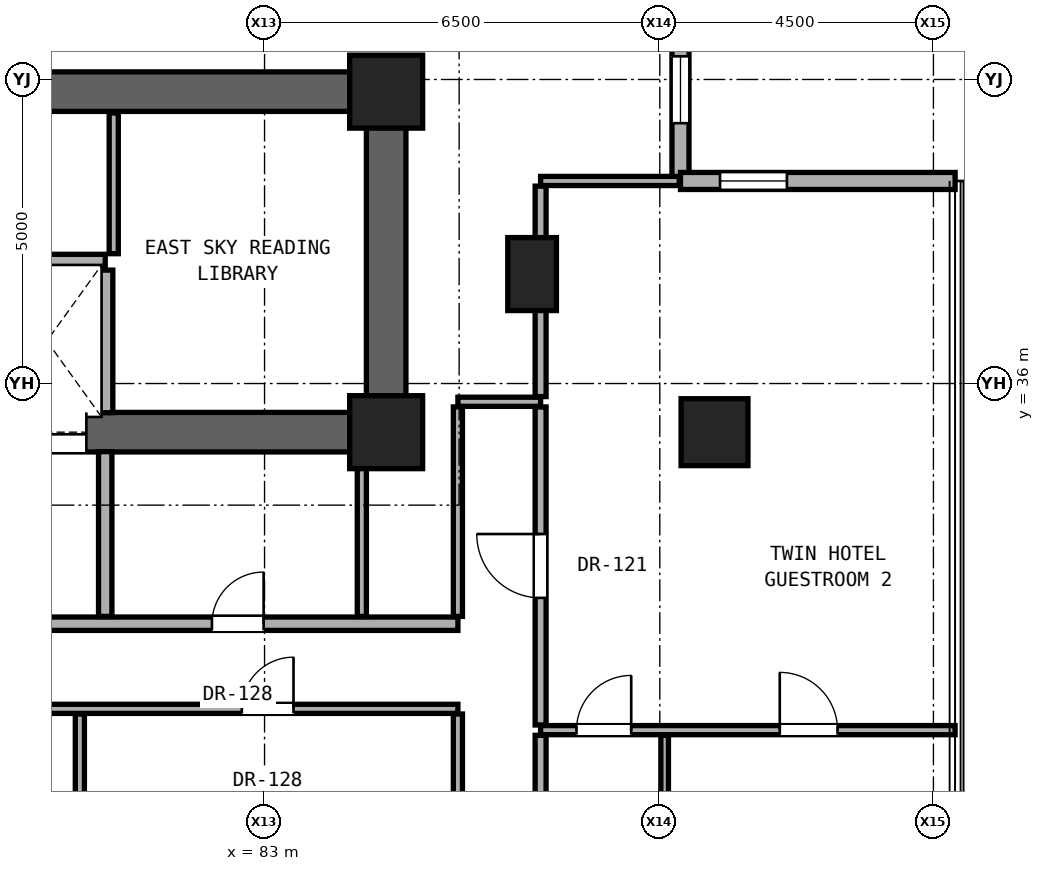
"""IFC4 building model, lengths in metres.
Left out: names, types, materials, properties, quantities, classifications, styles, units other than length and angle.
Written with IfcOpenShell. Run it as: python <this file> out.ifc"""

import sys

from ifc_helpers import new_model, si_unit, direction, frame, frame_2d, origin, origin_2d, place, context, subcontext, project, spatial, rectangle, hollow_rectangle, extrude, element, fill, save


model = new_model("IFC4")
c1 = context("Model", 3, precision=1e-05, world=origin(), true_north=direction((0.0, 1.0)))
c2 = subcontext(c1, "Body", "Model", "MODEL_VIEW")
j1 = project(units=[si_unit("LENGTHUNIT", "METRE"), si_unit("PLANEANGLEUNIT", "RADIAN")], contexts=[c1])
p1 = place(None, origin())
s1 = spatial("IfcSite", under=j1, at=p1, CompositionType="ELEMENT")
p2 = place(p1, origin())
s2 = spatial("IfcBuilding", under=s1, at=p2, CompositionType="ELEMENT")
p3 = place(p2, frame((0.0, 0.0, 98.3)))
s3 = spatial("IfcBuildingStorey", under=s2, at=p3, CompositionType="ELEMENT", Elevation=98.3)
for number, where, z_axis, x_axis in (
    (1, (85.0, 35.2, 0.0), (0.0, 0.0, 1.0), (1.0, 0.0, 0.0)),
    (2, (85.0, 40.8, 0.0), (0.0, 0.0, 1.0), (1.0, 0.0, 0.0)),
):
    element("IfcColumn", number, at=place(p3, frame(where, z_axis=z_axis, x_axis=x_axis)), inside=s3, PredefinedType="COLUMN", context=c2, shape_type="SweptSolid", body=[
        extrude(rectangle(XDim=1.2, YDim=1.2, at=origin_2d()), origin(), (0.0, 0.0, 1.0), 3.3),
    ])
p4 = place(p3, frame((90.4, 35.2, 0.0), z_axis=(0.0, 0.0, 1.0), x_axis=(1.0, 0.0, 0.0)))
e3 = element("IfcColumn", 3, at=p4, inside=s3, PredefinedType="COLUMN", context=c2, shape_type="SweptSolid", body=[
    extrude(hollow_rectangle(XDim=1.1, YDim=1.1, WallThickness=0.06, at=origin_2d()), origin(), (0.0, 0.0, 1.0), 3.3),
])
p5 = place(p3, frame((87.4, 37.8, 0.0), z_axis=(0.0, 0.0, 1.0), x_axis=(1.0, 0.0, 0.0)))
e4 = element("IfcColumn", 4, at=p5, inside=s3, PredefinedType="PILASTER", context=c2, shape_type="SweptSolid", body=[
    extrude(rectangle(XDim=0.8, YDim=1.2, at=origin_2d()), origin(), (0.0, 0.0, 1.0), 3.3),
])
p6 = place(p3, frame((68.0, 40.8, 0.0), z_axis=(0.0, 0.0, 1.0), x_axis=(1.0, 0.0, 0.0)))
e5 = element("IfcWall", 5, at=p6, inside=s3, PredefinedType="SHEAR", context=c2, shape_type="SweptSolid", body=[
    extrude(rectangle(XDim=17.0, YDim=0.65, at=frame_2d((8.5, 0.0))), origin(), (0.0, 0.0, 1.0), 3.08),
])
p7 = place(p3, frame((85.0, 35.2, 0.0), z_axis=(0.0, 0.0, 1.0), x_axis=(0.0, 1.0, 0.0)))
e6 = element("IfcWall", 6, at=p7, inside=s3, PredefinedType="SHEAR", context=c2, shape_type="SweptSolid", body=[
    extrude(rectangle(XDim=5.6, YDim=0.65, at=frame_2d((2.8, 0.0))), origin(), (0.0, 0.0, 1.0), 3.08),
])
p8 = place(p3, frame((68.0, 35.2, 0.0), z_axis=(0.0, 0.0, 1.0), x_axis=(1.0, 0.0, 0.0)))
e7 = element("IfcWall", 7, at=p8, inside=s3, PredefinedType="SHEAR", context=c2, shape_type="SweptSolid", body=[
    extrude(rectangle(XDim=17.0, YDim=0.65, at=frame_2d((8.5, 0.0))), origin(), (0.0, 0.0, 1.0), 3.08),
])
p9 = place(p8, frame((1.06, 0.0, 0.0)))
e8 = element("IfcOpeningElement", 8, at=p9, cuts=e7, PredefinedType="OPENING", context=c2, shape_type="SweptSolid", body=[
    extrude(rectangle(XDim=1.15, YDim=2.2, at=frame_2d((0.575, 1.1))), frame((0.0, 0.335, 0.0), z_axis=(0.0, -1.0, 0.0), x_axis=(1.0, 0.0, 0.0)), (0.0, 0.0, 1.0), 0.67),
])
p10 = place(p8, frame((8.75, 0.0, 0.0)))
e9 = element("IfcOpeningElement", 9, at=p10, cuts=e7, PredefinedType="OPENING", context=c2, shape_type="SweptSolid", body=[
    extrude(rectangle(XDim=1.4, YDim=2.35, at=frame_2d((0.7, 1.175))), frame((0.0, 0.335, 0.0), z_axis=(0.0, -1.0, 0.0), x_axis=(1.0, 0.0, 0.0)), (0.0, 0.0, 1.0), 0.67),
])
p11 = place(p8, frame((10.77, 0.0, 0.0)))
e10 = element("IfcOpeningElement", 10, at=p11, cuts=e7, PredefinedType="OPENING", context=c2, shape_type="SweptSolid", body=[
    extrude(rectangle(XDim=1.3, YDim=2.3, at=frame_2d((0.65, 1.15))), frame((0.0, 0.335, 0.0), z_axis=(0.0, -1.0, 0.0), x_axis=(1.0, 0.0, 0.0)), (0.0, 0.0, 1.0), 0.67),
])
p12 = place(p3, frame((89.84, 39.331, 0.0), z_axis=(0.0, 0.0, 1.0), x_axis=(0.0, 1.0, 0.0)))
e11 = element("IfcWall", 11, at=p12, inside=s3, PredefinedType="SOLIDWALL", context=c2, shape_type="SweptSolid", body=[
    extrude(rectangle(XDim=4.516, YDim=0.28, at=frame_2d((2.258, 0.0))), origin(), (0.0, 0.0, 1.0), 3.06),
])
p13 = place(p12, frame((0.95, 0.0, 0.85)))
e12 = element("IfcOpeningElement", 12, at=p13, cuts=e11, PredefinedType="OPENING", context=c2, shape_type="SweptSolid", body=[
    extrude(rectangle(XDim=1.1, YDim=2.0, at=frame_2d((0.55, 1.0))), frame((0.0, 0.15, 0.0), z_axis=(0.0, -1.0, 0.0), x_axis=(1.0, 0.0, 0.0)), (0.0, 0.0, 1.0), 0.3),
])
p14 = place(p3, frame((94.356, 39.331, 0.0), z_axis=(0.0, 0.0, 1.0), x_axis=(-1.0, 0.0, 0.0)))
e13 = element("IfcWall", 13, at=p14, inside=s3, PredefinedType="SOLIDWALL", context=c2, shape_type="SweptSolid", body=[
    extrude(rectangle(XDim=4.516, YDim=0.28, at=frame_2d((2.258, 0.0))), origin(), (0.0, 0.0, 1.0), 3.06),
])
p15 = place(p14, frame((2.766, 0.0, 0.85)))
e14 = element("IfcOpeningElement", 14, at=p15, cuts=e13, PredefinedType="OPENING", context=c2, shape_type="SweptSolid", body=[
    extrude(rectangle(XDim=1.1, YDim=2.0, at=frame_2d((0.55, 1.0))), frame((0.0, 0.15, 0.0), z_axis=(0.0, -1.0, 0.0), x_axis=(1.0, 0.0, 0.0)), (0.0, 0.0, 1.0), 0.3),
])
p16 = place(p3, frame((87.54, 30.3, 0.0), z_axis=(0.0, 0.0, 1.0), x_axis=(1.0, 0.0, 0.0)))
e15 = element("IfcWall", 15, at=p16, inside=s3, PredefinedType="PARTITIONING", context=c2, shape_type="SweptSolid", body=[
    extrude(rectangle(XDim=6.816, YDim=0.15, at=frame_2d((3.408, 0.0))), origin(), (0.0, 0.0, 1.0), 2.216),
])
p17 = place(p16, frame((3.933, 0.0, 0.0)))
e16 = element("IfcOpeningElement", 16, at=p17, cuts=e15, PredefinedType="OPENING", context=c2, shape_type="SweptSolid", body=[
    extrude(rectangle(XDim=0.95, YDim=2.15, at=frame_2d((0.475, 1.075))), frame((0.0, 0.085, 0.0), z_axis=(0.0, -1.0, 0.0), x_axis=(1.0, 0.0, 0.0)), (0.0, 0.0, 1.0), 0.17),
])
p18 = place(p16, frame((0.59, 0.0, 0.0)))
e17 = element("IfcOpeningElement", 17, at=p18, cuts=e15, PredefinedType="OPENING", context=c2, shape_type="SweptSolid", body=[
    extrude(rectangle(XDim=0.9, YDim=2.1, at=frame_2d((0.45, 1.05))), frame((0.0, 0.085, 0.0), z_axis=(0.0, -1.0, 0.0), x_axis=(1.0, 0.0, 0.0)), (0.0, 0.0, 1.0), 0.17),
])
p19 = place(p3, frame((66.68, 30.65, 0.0), z_axis=(0.0, 0.0, 1.0), x_axis=(1.0, 0.0, 0.0)))
e18 = element("IfcWall", 18, at=p19, inside=s3, PredefinedType="PARTITIONING", context=c2, shape_type="SweptSolid", body=[
    extrude(rectangle(XDim=19.5, YDim=0.15, at=frame_2d((9.75, 0.0))), origin(), (0.0, 0.0, 1.0), 2.145),
])
p20 = place(p19, frame((3.795, 0.0, 0.0)))
e19 = element("IfcOpeningElement", 19, at=p20, cuts=e18, PredefinedType="OPENING", context=c2, shape_type="SweptSolid", body=[
    extrude(rectangle(XDim=0.85, YDim=2.01, at=frame_2d((0.425, 1.005))), frame((0.0, 0.085, 0.0), z_axis=(0.0, -1.0, 0.0), x_axis=(1.0, 0.0, 0.0)), (0.0, 0.0, 1.0), 0.17),
])
p21 = place(p19, frame((8.902, 0.0, 0.0)))
e20 = element("IfcOpeningElement", 20, at=p21, cuts=e18, PredefinedType="OPENING", context=c2, shape_type="SweptSolid", body=[
    extrude(rectangle(XDim=0.85, YDim=2.01, at=frame_2d((0.425, 1.005))), frame((0.0, 0.085, 0.0), z_axis=(0.0, -1.0, 0.0), x_axis=(1.0, 0.0, 0.0)), (0.0, 0.0, 1.0), 0.17),
])
p22 = place(p19, frame((15.947, 0.0, 0.0)))
e21 = element("IfcOpeningElement", 21, at=p22, cuts=e18, PredefinedType="OPENING", context=c2, shape_type="SweptSolid", body=[
    extrude(rectangle(XDim=0.85, YDim=2.01, at=frame_2d((0.425, 1.005))), frame((0.0, 0.085, 0.0), z_axis=(0.0, -1.0, 0.0), x_axis=(1.0, 0.0, 0.0)), (0.0, 0.0, 1.0), 0.17),
])
p23 = place(p3, frame((71.55, 32.05, 0.0), z_axis=(0.0, 0.0, 1.0), x_axis=(1.0, 0.0, 0.0)))
e22 = element("IfcWall", 22, at=p23, inside=s3, PredefinedType="SOLIDWALL", context=c2, shape_type="SweptSolid", body=[
    extrude(rectangle(XDim=14.63, YDim=0.22, at=frame_2d((7.315, 0.0))), origin(), (0.0, 0.0, 1.0), 2.145),
])
p24 = place(p23, frame((6.065, 0.0, 0.0)))
e23 = element("IfcOpeningElement", 23, at=p24, cuts=e22, PredefinedType="OPENING", context=c2, shape_type="SweptSolid", body=[
    extrude(rectangle(XDim=0.85, YDim=2.01, at=frame_2d((0.425, 1.005))), frame((0.0, 0.12, 0.0), z_axis=(0.0, -1.0, 0.0), x_axis=(1.0, 0.0, 0.0)), (0.0, 0.0, 1.0), 0.24),
])
p25 = place(p23, frame((10.585, 0.0, 0.0)))
e24 = element("IfcOpeningElement", 24, at=p25, cuts=e22, PredefinedType="OPENING", context=c2, shape_type="SweptSolid", body=[
    extrude(rectangle(XDim=0.85, YDim=2.01, at=frame_2d((0.425, 1.005))), frame((0.0, 0.12, 0.0), z_axis=(0.0, -1.0, 0.0), x_axis=(1.0, 0.0, 0.0)), (0.0, 0.0, 1.0), 0.24),
])
p26 = place(p23, frame((0.7, 0.0, 0.0)))
e25 = element("IfcOpeningElement", 25, at=p26, cuts=e22, PredefinedType="OPENING", context=c2, shape_type="SweptSolid", body=[
    extrude(rectangle(XDim=0.85, YDim=2.01, at=frame_2d((0.425, 1.005))), frame((0.0, 0.12, 0.0), z_axis=(0.0, -1.0, 0.0), x_axis=(1.0, 0.0, 0.0)), (0.0, 0.0, 1.0), 0.24),
])
p27 = place(p23, frame((2.55, 0.0, 0.0)))
e26 = element("IfcOpeningElement", 26, at=p27, cuts=e22, PredefinedType="OPENING", context=c2, shape_type="SweptSolid", body=[
    extrude(rectangle(XDim=0.85, YDim=2.01, at=frame_2d((0.425, 1.005))), frame((0.0, 0.12, 0.0), z_axis=(0.0, -1.0, 0.0), x_axis=(1.0, 0.0, 0.0)), (0.0, 0.0, 1.0), 0.24),
])
p28 = place(p3, frame((86.18, 35.7, 0.0), z_axis=(0.0, 0.0, 1.0), x_axis=(1.0, 0.0, 0.0)))
e27 = element("IfcWall", 27, at=p28, inside=s3, PredefinedType="PARTITIONING", context=c2, shape_type="SweptSolid", body=[
    extrude(rectangle(XDim=1.36, YDim=0.15, at=frame_2d((0.68, 0.0))), origin(), (0.0, 0.0, 1.0), 3.08),
])
p29 = place(p3, frame((76.72, 38.0, 0.0), z_axis=(0.0, 0.0, 1.0), x_axis=(1.0, 0.0, 0.0)))
e28 = element("IfcWall", 28, at=p29, inside=s3, PredefinedType="SOLIDWALL", context=c2, shape_type="SweptSolid", body=[
    extrude(rectangle(XDim=3.66, YDim=0.25, at=frame_2d((1.83, 0.0))), origin(), (0.0, 0.0, 1.0), 3.08),
])
p30 = place(p3, frame((87.54, 39.331, 0.0), z_axis=(0.0, 0.0, 1.0), x_axis=(1.0, 0.0, 0.0)))
e29 = element("IfcWall", 29, at=p30, inside=s3, PredefinedType="PARTITIONING", context=c2, shape_type="SweptSolid", body=[
    extrude(rectangle(XDim=2.28, YDim=0.15, at=frame_2d((1.14, 0.0))), origin(), (0.0, 0.0, 1.0), 3.08),
])
p31 = place(p3, frame((79.963, 26.17, 0.0), z_axis=(0.0, 0.0, 1.0), x_axis=(0.0, 1.0, 0.0)))
e30 = element("IfcWall", 30, at=p31, inside=s3, PredefinedType="PARTITIONING", context=c2, shape_type="SweptSolid", body=[
    extrude(rectangle(XDim=4.395, YDim=0.15, at=frame_2d((2.198, 0.0))), origin(), (0.0, 0.0, 1.0), 2.145),
])
p32 = place(p3, frame((80.38, 32.17, 0.0), z_axis=(0.0, 0.0, 1.0), x_axis=(0.0, 1.0, 0.0)))
e31 = element("IfcWall", 31, at=p32, inside=s3, PredefinedType="SOLIDWALL", context=c2, shape_type="SweptSolid", body=[
    extrude(rectangle(XDim=2.71, YDim=0.22, at=frame_2d((1.355, 0.0))), origin(), (0.0, 0.0, 1.0), 3.08),
])
p33 = place(p3, frame((80.38, 35.52, 0.0), z_axis=(0.0, 0.0, 1.0), x_axis=(0.0, 1.0, 0.0)))
e32 = element("IfcWall", 32, at=p33, inside=s3, PredefinedType="SOLIDWALL", context=c2, shape_type="SweptSolid", body=[
    extrude(rectangle(XDim=2.345, YDim=0.25, at=frame_2d((1.172, 0.0))), origin(), (0.0, 0.0, 1.0), 3.08),
])
p34 = place(p3, frame((80.52, 38.135, 0.0), z_axis=(0.0, 0.0, 1.0), x_axis=(0.0, 1.0, 0.0)))
e33 = element("IfcWall", 33, at=p34, inside=s3, PredefinedType="PARTITIONING", context=c2, shape_type="SweptSolid", body=[
    extrude(rectangle(XDim=2.315, YDim=0.15, at=frame_2d((1.157, 0.0))), origin(), (0.0, 0.0, 1.0), 3.08),
])
p35 = place(p3, frame((84.6, 32.17, 0.0), z_axis=(0.0, 0.0, 1.0), x_axis=(0.0, 1.0, 0.0)))
e34 = element("IfcWall", 34, at=p35, inside=s3, PredefinedType="PARTITIONING", context=c2, shape_type="SweptSolid", body=[
    extrude(rectangle(XDim=2.71, YDim=0.15, at=frame_2d((1.355, 0.0))), origin(), (0.0, 0.0, 1.0), 3.08),
])
p36 = place(p3, frame((86.18, 26.17, 0.0), z_axis=(0.0, 0.0, 1.0), x_axis=(0.0, 1.0, 0.0)))
e35 = element("IfcWall", 35, at=p36, inside=s3, PredefinedType="PARTITIONING", context=c2, shape_type="SweptSolid", body=[
    extrude(rectangle(XDim=4.395, YDim=0.15, at=frame_2d((2.198, 0.0))), origin(), (0.0, 0.0, 1.0), 2.299),
])
p37 = place(p3, frame((86.18, 32.17, 0.0), z_axis=(0.0, 0.0, 1.0), x_axis=(0.0, 1.0, 0.0)))
e36 = element("IfcWall", 36, at=p37, inside=s3, PredefinedType="PARTITIONING", context=c2, shape_type="SweptSolid", body=[
    extrude(rectangle(XDim=3.445, YDim=0.15, at=frame_2d((1.723, 0.0))), origin(), (0.0, 0.0, 1.0), 2.472),
])
p38 = place(p3, frame((87.54, 28.073, 0.0), z_axis=(0.0, 0.0, 1.0), x_axis=(0.0, 1.0, 0.0)))
e37 = element("IfcWall", 37, at=p38, inside=s3, PredefinedType="PARTITIONING", context=c2, shape_type="SweptSolid", body=[
    extrude(rectangle(XDim=2.143, YDim=0.18, at=frame_2d((1.071, 0.0))), origin(), (0.0, 0.0, 1.0), 2.299),
])
p39 = place(p3, frame((87.54, 30.385, 0.0), z_axis=(0.0, 0.0, 1.0), x_axis=(0.0, 1.0, 0.0)))
e38 = element("IfcWall", 38, at=p39, inside=s3, PredefinedType="PARTITIONING", context=c2, shape_type="SweptSolid", body=[
    extrude(rectangle(XDim=5.23, YDim=0.18, at=frame_2d((2.615, 0.0))), origin(), (0.0, 0.0, 1.0), 2.472),
])
p40 = place(p39, frame((2.09, 0.0, 0.0)))
e39 = element("IfcOpeningElement", 39, at=p40, cuts=e38, PredefinedType="OPENING", context=c2, shape_type="SweptSolid", body=[
    extrude(rectangle(XDim=1.05, YDim=2.2, at=frame_2d((0.525, 1.1))), frame((0.0, 0.1, 0.0), z_axis=(0.0, -1.0, 0.0), x_axis=(1.0, 0.0, 0.0)), (0.0, 0.0, 1.0), 0.2),
])
p41 = place(p3, frame((87.54, 35.785, 0.0), z_axis=(0.0, 0.0, 1.0), x_axis=(0.0, 1.0, 0.0)))
e40 = element("IfcWall", 40, at=p41, inside=s3, PredefinedType="PARTITIONING", context=c2, shape_type="SweptSolid", body=[
    extrude(rectangle(XDim=3.461, YDim=0.18, at=frame_2d((1.73, 0.0))), origin(), (0.0, 0.0, 1.0), 2.456),
])
p42 = place(p3, frame((89.58, 28.073, 0.0), z_axis=(0.0, 0.0, 1.0), x_axis=(0.0, 1.0, 0.0)))
e41 = element("IfcWall", 41, at=p42, inside=s3, PredefinedType="PARTITIONING", context=c2, shape_type="SweptSolid", body=[
    extrude(rectangle(XDim=2.143, YDim=0.125, at=frame_2d((1.071, 0.0))), origin(), (0.0, 0.0, 1.0), 2.299),
])
p43 = place(p13, origin())
e42 = element("IfcWindow", 42, at=p43, inside=s3, PartitioningType="SINGLE_PANEL", PredefinedType="WINDOW", context=c2, shape_type="SweptSolid", body=[
    extrude(rectangle(XDim=1.1, YDim=2.0, at=frame_2d((0.55, 1.0))), frame((0.0, 0.03, 0.0), z_axis=(0.0, -1.0, 0.0), x_axis=(1.0, 0.0, 0.0)), (0.0, 0.0, 1.0), 0.06),
])
fill(e12, e42)
p44 = place(p15, origin())
e43 = element("IfcWindow", 43, at=p44, inside=s3, PartitioningType="SINGLE_PANEL", PredefinedType="WINDOW", context=c2, shape_type="SweptSolid", body=[
    extrude(rectangle(XDim=1.1, YDim=2.0, at=frame_2d((0.55, 1.0))), frame((0.0, 0.03, 0.0), z_axis=(0.0, -1.0, 0.0), x_axis=(1.0, 0.0, 0.0)), (0.0, 0.0, 1.0), 0.06),
])
fill(e14, e43)
p45 = place(p25, origin())
e44 = element("IfcDoor", 44, at=p45, inside=s3, OperationType="SINGLE_SWING_RIGHT", PredefinedType="DOOR", context=c2, shape_type="SweptSolid", body=[
    extrude(rectangle(XDim=0.85, YDim=2.01, at=frame_2d((0.425, 1.005))), frame((0.0, 0.025, 0.0), z_axis=(0.0, -1.0, 0.0), x_axis=(1.0, 0.0, 0.0)), (0.0, 0.0, 1.0), 0.05),
])
fill(e24, e44)
p46 = place(p40, origin())
e45 = element("IfcDoor", 45, at=p46, inside=s3, OperationType="SINGLE_SWING_RIGHT", PredefinedType="DOOR", context=c2, shape_type="SweptSolid", body=[
    extrude(rectangle(XDim=1.05, YDim=2.2, at=frame_2d((0.525, 1.1))), frame((0.0, 0.025, 0.0), z_axis=(0.0, -1.0, 0.0), x_axis=(1.0, 0.0, 0.0)), (0.0, 0.0, 1.0), 0.05),
])
fill(e39, e45)
p47 = place(p17, origin())
e46 = element("IfcDoor", 46, at=p47, inside=s3, OperationType="SINGLE_SWING_LEFT", PredefinedType="DOOR", context=c2, shape_type="SweptSolid", body=[
    extrude(rectangle(XDim=0.95, YDim=2.15, at=frame_2d((0.475, 1.075))), frame((0.0, 0.025, 0.0), z_axis=(0.0, -1.0, 0.0), x_axis=(1.0, 0.0, 0.0)), (0.0, 0.0, 1.0), 0.05),
])
fill(e16, e46)
p48 = place(p18, origin())
e47 = element("IfcDoor", 47, at=p48, inside=s3, OperationType="SINGLE_SWING_RIGHT", PredefinedType="DOOR", context=c2, shape_type="SweptSolid", body=[
    extrude(rectangle(XDim=0.9, YDim=2.1, at=frame_2d((0.45, 1.05))), frame((0.0, 0.025, 0.0), z_axis=(0.0, -1.0, 0.0), x_axis=(1.0, 0.0, 0.0)), (0.0, 0.0, 1.0), 0.05),
])
fill(e17, e47)
p49 = place(p22, origin())
e48 = element("IfcDoor", 48, at=p49, inside=s3, OperationType="SINGLE_SWING_RIGHT", PredefinedType="DOOR", context=c2, shape_type="SweptSolid", body=[
    extrude(rectangle(XDim=0.85, YDim=2.01, at=frame_2d((0.425, 1.005))), frame((0.0, 0.025, 0.0), z_axis=(0.0, -1.0, 0.0), x_axis=(1.0, 0.0, 0.0)), (0.0, 0.0, 1.0), 0.05),
])
fill(e21, e48)
p50 = place(p11, origin())
e49 = element("IfcDoor", 49, at=p50, inside=s3, OperationType="DOUBLE_DOOR_SLIDING", PredefinedType="DOOR", context=c2, shape_type="SweptSolid", body=[
    extrude(rectangle(XDim=1.3, YDim=2.3, at=frame_2d((0.65, 1.15))), frame((0.0, 0.025, 0.0), z_axis=(0.0, -1.0, 0.0), x_axis=(1.0, 0.0, 0.0)), (0.0, 0.0, 1.0), 0.05),
])
fill(e10, e49)
save(model, sys.argv[1])
